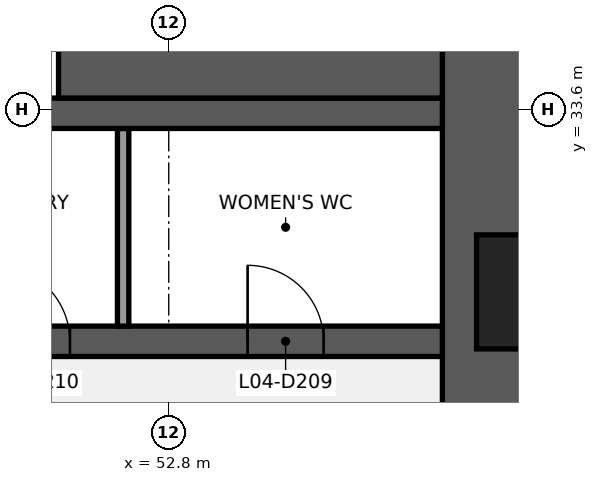
"""IFC4 building model, lengths in metres.
Left out: names, types, materials, properties, quantities, classifications, styles, units other than length and angle.
Written with IfcOpenShell. Run it as: python <this file> out.ifc"""

import sys

from ifc_helpers import new_model, si_unit, direction, frame, frame_2d, origin, place, context, subcontext, project, spatial, rectangle, extrude, element, fill, save


model = new_model("IFC4")
c1 = context("Model", 3, precision=1e-05, world=origin(), true_north=direction((0.0, 1.0)))
c2 = subcontext(c1, "Body", "Model", "MODEL_VIEW")
j1 = project(units=[si_unit("LENGTHUNIT", "METRE"), si_unit("PLANEANGLEUNIT", "RADIAN")], contexts=[c1])
p1 = place(None, origin())
s1 = spatial("IfcSite", under=j1, at=p1, CompositionType="ELEMENT")
p2 = place(p1, origin())
s2 = spatial("IfcBuilding", under=s1, at=p2, CompositionType="ELEMENT")
p3 = place(p2, frame((0.0, 0.0, 25.8)))
s3 = spatial("IfcBuildingStorey", under=s2, at=p3, CompositionType="ELEMENT", Elevation=25.8)
p4 = place(p3, frame((57.0, 38.4, 0.0), z_axis=(0.0, 0.0, 1.0), x_axis=(0.0, -1.0, 0.0)))
e1 = element("IfcWall", 1, at=p4, inside=s3, PredefinedType="SHEAR", context=c2, shape_type="SweptSolid", body=[
    extrude(rectangle(XDim=28.8, YDim=1.2, at=frame_2d((14.4, 0.0))), origin(), (0.0, 0.0, 1.0), 4.24),
])
p5 = place(p4, frame((18.45, 0.0, 0.9)))
e2 = element("IfcOpeningElement", 2, at=p5, cuts=e1, PredefinedType="OPENING", context=c2, shape_type="SweptSolid", body=[
    extrude(rectangle(XDim=1.5, YDim=1.5, at=frame_2d((0.75, 0.75))), frame((0.0, 0.61, 0.0), z_axis=(0.0, -1.0, 0.0), x_axis=(1.0, 0.0, 0.0)), (0.0, 0.0, 1.0), 1.22),
])
p6 = place(p4, frame((8.85, 0.0, 0.9)))
e3 = element("IfcOpeningElement", 3, at=p6, cuts=e1, PredefinedType="OPENING", context=c2, shape_type="SweptSolid", body=[
    extrude(rectangle(XDim=1.5, YDim=1.5, at=frame_2d((0.75, 0.75))), frame((0.0, 0.61, 0.0), z_axis=(0.0, -1.0, 0.0), x_axis=(1.0, 0.0, 0.0)), (0.0, 0.0, 1.0), 1.22),
])
p7 = place(p3, frame((39.6, 30.55, 0.0), z_axis=(0.0, 0.0, 1.0), x_axis=(1.0, 0.0, 0.0)))
e4 = element("IfcWall", 4, at=p7, inside=s3, PredefinedType="SHEAR", context=c2, shape_type="SweptSolid", body=[
    extrude(rectangle(XDim=16.8, YDim=0.4, at=frame_2d((8.4, 0.0))), origin(), (0.0, 0.0, 1.0), 4.24),
])
p8 = place(p7, frame((14.238, 0.0, 0.0)))
e5 = element("IfcOpeningElement", 5, at=p8, cuts=e4, PredefinedType="OPENING", context=c2, shape_type="SweptSolid", body=[
    extrude(rectangle(XDim=1.0, YDim=2.1, at=frame_2d((0.5, 1.05))), frame((0.0, 0.21, 0.0), z_axis=(0.0, -1.0, 0.0), x_axis=(1.0, 0.0, 0.0)), (0.0, 0.0, 1.0), 0.42),
])
p9 = place(p7, frame((10.9, 0.0, 0.0)))
e6 = element("IfcOpeningElement", 6, at=p9, cuts=e4, PredefinedType="OPENING", context=c2, shape_type="SweptSolid", body=[
    extrude(rectangle(XDim=1.0, YDim=2.1, at=frame_2d((0.5, 1.05))), frame((0.0, 0.21, 0.0), z_axis=(0.0, -1.0, 0.0), x_axis=(1.0, 0.0, 0.0)), (0.0, 0.0, 1.0), 0.42),
])
p10 = place(p7, frame((6.7, 0.0, 0.0)))
e7 = element("IfcOpeningElement", 7, at=p10, cuts=e4, PredefinedType="OPENING", context=c2, shape_type="SweptSolid", body=[
    extrude(rectangle(XDim=1.0, YDim=2.1, at=frame_2d((0.5, 1.05))), frame((0.0, 0.21, 0.0), z_axis=(0.0, -1.0, 0.0), x_axis=(1.0, 0.0, 0.0)), (0.0, 0.0, 1.0), 0.42),
])
p11 = place(p7, frame((1.562, 0.0, 0.0)))
e8 = element("IfcOpeningElement", 8, at=p11, cuts=e4, PredefinedType="OPENING", context=c2, shape_type="SweptSolid", body=[
    extrude(rectangle(XDim=1.0, YDim=2.1, at=frame_2d((0.5, 1.05))), frame((0.0, 0.21, 0.0), z_axis=(0.0, -1.0, 0.0), x_axis=(1.0, 0.0, 0.0)), (0.0, 0.0, 1.0), 0.42),
])
p12 = place(p3, frame((52.2, 30.75, 0.0), z_axis=(0.0, 0.0, 1.0), x_axis=(0.0, 1.0, 0.0)))
e9 = element("IfcWall", 9, at=p12, inside=s3, PredefinedType="PARTITIONING", context=c2, shape_type="SweptSolid", body=[
    extrude(rectangle(XDim=2.6, YDim=0.15, at=frame_2d((1.3, 0.0))), origin(), (0.0, 0.0, 1.0), 4.24),
])
p13 = place(p3, frame((39.6, 33.55, 0.0), z_axis=(0.0, 0.0, 1.0), x_axis=(1.0, 0.0, 0.0)))
e10 = element("IfcWall", 10, at=p13, inside=s3, PredefinedType="SHEAR", context=c2, shape_type="SweptSolid", body=[
    extrude(rectangle(XDim=16.8, YDim=0.4, at=frame_2d((8.4, 0.0))), origin(), (0.0, 0.0, 1.0), 4.24),
])
p14 = place(p3, frame((51.35, 35.475, 0.0), z_axis=(0.0, 0.0, 1.0), x_axis=(1.0, 0.0, 0.0)))
e11 = element("IfcWall", 11, at=p14, inside=s3, PredefinedType="SHEAR", context=c2, shape_type="SweptSolid", body=[
    extrude(rectangle(XDim=5.05, YDim=3.45, at=frame_2d((2.525, 0.0))), origin(), (0.0, 0.0, 1.0), 4.24),
])
p15 = place(p8, origin())
e12 = element("IfcDoor", 12, at=p15, inside=s3, OperationType="SINGLE_SWING_LEFT", PredefinedType="DOOR", context=c2, shape_type="SweptSolid", body=[
    extrude(rectangle(XDim=1.0, YDim=2.1, at=frame_2d((0.5, 1.05))), frame((0.0, 0.025, 0.0), z_axis=(0.0, -1.0, 0.0), x_axis=(1.0, 0.0, 0.0)), (0.0, 0.0, 1.0), 0.05),
])
fill(e5, e12)
p16 = place(p9, origin())
e13 = element("IfcDoor", 13, at=p16, inside=s3, OperationType="SINGLE_SWING_LEFT", PredefinedType="DOOR", context=c2, shape_type="SweptSolid", body=[
    extrude(rectangle(XDim=1.0, YDim=2.1, at=frame_2d((0.5, 1.05))), frame((0.0, 0.025, 0.0), z_axis=(0.0, -1.0, 0.0), x_axis=(1.0, 0.0, 0.0)), (0.0, 0.0, 1.0), 0.05),
])
fill(e6, e13)
save(model, sys.argv[1])
